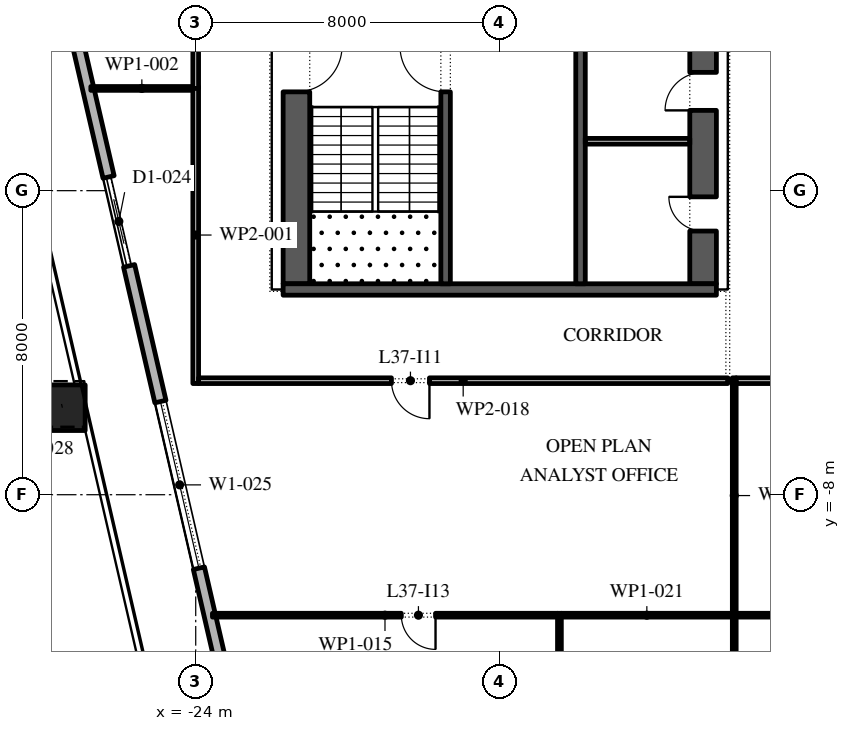
"""IFC4 building model, lengths in metres.
Left out: names, types, materials, properties, quantities, classifications, styles, units other than length and angle.
Written with IfcOpenShell. Run it as: python <this file> out.ifc"""

import sys

from ifc_helpers import new_model, si_unit, direction, frame, frame_2d, origin, origin_2d, place, context, subcontext, project, spatial, rectangle, extrude, element, fill, save


model = new_model("IFC4")
c1 = context("Model", 3, precision=1e-05, world=origin(), true_north=direction((0.0, 1.0)))
c2 = subcontext(c1, "Body", "Model", "MODEL_VIEW")
j1 = project(units=[si_unit("LENGTHUNIT", "METRE"), si_unit("PLANEANGLEUNIT", "RADIAN")], contexts=[c1])
p1 = place(None, origin())
s1 = spatial("IfcSite", under=j1, at=p1, CompositionType="ELEMENT")
p2 = place(p1, origin())
s2 = spatial("IfcBuilding", under=s1, at=p2, CompositionType="ELEMENT")
p3 = place(p2, frame((0.0, 0.0, 171.6)))
s3 = spatial("IfcBuildingStorey", under=s2, at=p3, CompositionType="ELEMENT", Elevation=171.6)
p4 = place(p3, frame((-27.509, -5.711, 0.0), z_axis=(-0.005404479485, 0.023361298418, 0.999712479335), x_axis=(-0.974268511785, -0.225390476607, 0.0)))
e1 = element("IfcColumn", 1, at=p4, inside=s3, PredefinedType="COLUMN", context=c2, shape_type="SweptSolid", body=[
    extrude(rectangle(XDim=1.2, YDim=1.2, at=origin_2d()), origin(), (0.0, 0.0, 1.0), 4.201),
])
p5 = place(p3, frame((-17.592, -20.657, 0.0), z_axis=(0.0, 0.0, 1.0), x_axis=(0.974370243697, 0.224950279389, 0.0)))
e2 = element("IfcWall", 2, at=p5, inside=s3, PredefinedType="STANDARD", context=c2, shape_type="SweptSolid", body=[
    extrude(rectangle(XDim=49.5, YDim=0.3, at=frame_2d((24.75, 0.0))), origin(), (0.0, 0.0, 1.0), 4.0),
])
p6 = place(p5, frame((3.6, 0.0, 0.0)))
e3 = element("IfcOpeningElement", 3, at=p6, cuts=e2, PredefinedType="OPENING", context=c2, shape_type="SweptSolid", body=[
    extrude(rectangle(XDim=2.4, YDim=3.5, at=frame_2d((1.2, 1.75))), frame((0.0, 0.16, 0.0), z_axis=(0.0, -1.0, 0.0), x_axis=(1.0, 0.0, 0.0)), (0.0, 0.0, 1.0), 0.32),
])
p7 = place(p5, frame((9.9, 0.0, 0.45)))
e4 = element("IfcOpeningElement", 4, at=p7, cuts=e2, PredefinedType="OPENING", context=c2, shape_type="SweptSolid", body=[
    extrude(rectangle(XDim=4.5, YDim=2.575, at=frame_2d((2.25, 1.288))), frame((0.0, 0.16, 0.0), z_axis=(0.0, -1.0, 0.0), x_axis=(1.0, 0.0, 0.0)), (0.0, 0.0, 1.0), 0.32),
])
p8 = place(p5, frame((18.2, 0.0, 0.45)))
e5 = element("IfcOpeningElement", 5, at=p8, cuts=e2, PredefinedType="OPENING", context=c2, shape_type="SweptSolid", body=[
    extrude(rectangle(XDim=4.5, YDim=3.05, at=frame_2d((2.25, 1.525))), frame((0.0, 0.16, 0.0), z_axis=(0.0, -1.0, 0.0), x_axis=(1.0, 0.0, 0.0)), (0.0, 0.0, 1.0), 0.32),
])
p9 = place(p5, frame((26.5, 0.0, 0.45)))
e6 = element("IfcOpeningElement", 6, at=p9, cuts=e2, PredefinedType="OPENING", context=c2, shape_type="SweptSolid", body=[
    extrude(rectangle(XDim=4.5, YDim=2.75, at=frame_2d((2.25, 1.375))), frame((0.0, 0.16, 0.0), z_axis=(0.0, -1.0, 0.0), x_axis=(1.0, 0.0, 0.0)), (0.0, 0.0, 1.0), 0.32),
])
p10 = place(p5, frame((36.8, 0.0, 0.0)))
e7 = element("IfcOpeningElement", 7, at=p10, cuts=e2, PredefinedType="OPENING", context=c2, shape_type="SweptSolid", body=[
    extrude(rectangle(XDim=2.4, YDim=3.275, at=frame_2d((1.2, 1.637))), frame((0.0, 0.16, 0.0), z_axis=(0.0, -1.0, 0.0), x_axis=(1.0, 0.0, 0.0)), (0.0, 0.0, 1.0), 0.32),
])
p11 = place(p5, frame((43.1, 0.0, 0.45)))
e8 = element("IfcOpeningElement", 8, at=p11, cuts=e2, PredefinedType="OPENING", context=c2, shape_type="SweptSolid", body=[
    extrude(rectangle(XDim=4.5, YDim=2.875, at=frame_2d((2.25, 1.438))), frame((0.0, 0.16, 0.0), z_axis=(0.0, -1.0, 0.0), x_axis=(1.0, 0.0, 0.0)), (0.0, 0.0, 1.0), 0.32),
])
p12 = place(p3, frame((-33.157, 30.092, 0.0), z_axis=(0.0, 0.0, 1.0), x_axis=(0.224950279389, -0.974370243697, 0.0)))
e9 = element("IfcWall", 9, at=p12, inside=s3, PredefinedType="STANDARD", context=c2, shape_type="SweptSolid", body=[
    extrude(rectangle(XDim=49.5, YDim=0.3, at=frame_2d((24.75, 0.0))), origin(), (0.0, 0.0, 1.0), 4.0),
])
p13 = place(p12, frame((2.207, 0.0, 0.0)))
e10 = element("IfcOpeningElement", 10, at=p13, cuts=e9, PredefinedType="OPENING", context=c2, shape_type="SweptSolid", body=[
    extrude(rectangle(XDim=2.4, YDim=3.5, at=frame_2d((1.2, 1.75))), frame((0.0, 0.16, 0.0), z_axis=(0.0, -1.0, 0.0), x_axis=(1.0, 0.0, 0.0)), (0.0, 0.0, 1.0), 0.32),
])
p14 = place(p12, frame((8.121, 0.0, 0.45)))
e11 = element("IfcOpeningElement", 11, at=p14, cuts=e9, PredefinedType="OPENING", context=c2, shape_type="SweptSolid", body=[
    extrude(rectangle(XDim=4.5, YDim=2.825, at=frame_2d((2.25, 1.413))), frame((0.0, 0.16, 0.0), z_axis=(0.0, -1.0, 0.0), x_axis=(1.0, 0.0, 0.0)), (0.0, 0.0, 1.0), 0.32),
])
p15 = place(p12, frame((15.236, 0.0, 0.45)))
e12 = element("IfcOpeningElement", 12, at=p15, cuts=e9, PredefinedType="OPENING", context=c2, shape_type="SweptSolid", body=[
    extrude(rectangle(XDim=4.5, YDim=2.95, at=frame_2d((2.25, 1.475))), frame((0.0, 0.16, 0.0), z_axis=(0.0, -1.0, 0.0), x_axis=(1.0, 0.0, 0.0)), (0.0, 0.0, 1.0), 0.32),
])
p16 = place(p12, frame((22.35, 0.0, 0.45)))
e13 = element("IfcOpeningElement", 13, at=p16, cuts=e9, PredefinedType="OPENING", context=c2, shape_type="SweptSolid", body=[
    extrude(rectangle(XDim=4.5, YDim=3.0, at=frame_2d((2.25, 1.5))), frame((0.0, 0.16, 0.0), z_axis=(0.0, -1.0, 0.0), x_axis=(1.0, 0.0, 0.0)), (0.0, 0.0, 1.0), 0.32),
])
p17 = place(p12, frame((30.514, 0.0, 0.0)))
e14 = element("IfcOpeningElement", 14, at=p17, cuts=e9, PredefinedType="OPENING", context=c2, shape_type="SweptSolid", body=[
    extrude(rectangle(XDim=2.4, YDim=3.5, at=frame_2d((1.2, 1.75))), frame((0.0, 0.16, 0.0), z_axis=(0.0, -1.0, 0.0), x_axis=(1.0, 0.0, 0.0)), (0.0, 0.0, 1.0), 0.32),
])
p18 = place(p12, frame((36.579, 0.0, 0.45)))
e15 = element("IfcOpeningElement", 15, at=p18, cuts=e9, PredefinedType="OPENING", context=c2, shape_type="SweptSolid", body=[
    extrude(rectangle(XDim=4.5, YDim=3.05, at=frame_2d((2.25, 1.525))), frame((0.0, 0.16, 0.0), z_axis=(0.0, -1.0, 0.0), x_axis=(1.0, 0.0, 0.0)), (0.0, 0.0, 1.0), 0.32),
])
p19 = place(p12, frame((43.693, 0.0, 0.45)))
e16 = element("IfcOpeningElement", 16, at=p19, cuts=e9, PredefinedType="OPENING", context=c2, shape_type="SweptSolid", body=[
    extrude(rectangle(XDim=4.5, YDim=3.05, at=frame_2d((2.25, 1.525))), frame((0.0, 0.16, 0.0), z_axis=(0.0, -1.0, 0.0), x_axis=(1.0, 0.0, 0.0)), (0.0, 0.0, 1.0), 0.32),
])
p20 = place(p3, frame((-21.35, -2.45, 0.0), z_axis=(0.0, 0.0, 1.0), x_axis=(0.0, 1.0, 0.0)))
e17 = element("IfcWall", 17, at=p20, inside=s3, PredefinedType="SHEAR", context=c2, shape_type="SweptSolid", body=[
    extrude(rectangle(XDim=27.9, YDim=0.7, at=frame_2d((13.95, 0.0))), origin(), (0.0, 0.0, 1.0), 4.0),
])
p21 = place(p20, frame((5.05, 0.0, 0.0)))
e18 = element("IfcOpeningElement", 18, at=p21, cuts=e17, PredefinedType="OPENING", context=c2, shape_type="SweptSolid", body=[
    extrude(rectangle(XDim=1.2, YDim=2.1, at=frame_2d((0.6, 1.05))), frame((0.0, 0.36, 0.0), z_axis=(0.0, -1.0, 0.0), x_axis=(1.0, 0.0, 0.0)), (0.0, 0.0, 1.0), 0.72),
])
p22 = place(p20, frame((21.65, 0.0, 0.0)))
e19 = element("IfcOpeningElement", 19, at=p22, cuts=e17, PredefinedType="OPENING", context=c2, shape_type="SweptSolid", body=[
    extrude(rectangle(XDim=1.2, YDim=2.1, at=frame_2d((0.6, 1.05))), frame((0.0, 0.36, 0.0), z_axis=(0.0, -1.0, 0.0), x_axis=(1.0, 0.0, 0.0)), (0.0, 0.0, 1.0), 0.72),
])
p23 = place(p3, frame((-10.65, -2.45, 0.0), z_axis=(0.0, 0.0, 1.0), x_axis=(0.0, 1.0, 0.0)))
e20 = element("IfcWall", 20, at=p23, inside=s3, PredefinedType="SHEAR", context=c2, shape_type="SweptSolid", body=[
    extrude(rectangle(XDim=27.9, YDim=0.7, at=frame_2d((13.95, 0.0))), origin(), (0.0, 0.0, 1.0), 4.0),
])
p24 = place(p23, frame((23.65, 0.0, 0.0)))
e21 = element("IfcOpeningElement", 21, at=p24, cuts=e20, PredefinedType="OPENING", context=c2, shape_type="SweptSolid", body=[
    extrude(rectangle(XDim=2.4, YDim=2.1, at=frame_2d((1.2, 1.05))), frame((0.0, 0.36, 0.0), z_axis=(0.0, -1.0, 0.0), x_axis=(1.0, 0.0, 0.0)), (0.0, 0.0, 1.0), 0.72),
])
p25 = place(p23, frame((1.387, 0.0, 0.0)))
e22 = element("IfcOpeningElement", 22, at=p25, cuts=e20, PredefinedType="OPENING", context=c2, shape_type="SweptSolid", body=[
    extrude(rectangle(XDim=0.9, YDim=2.1, at=frame_2d((0.45, 1.05))), frame((0.0, 0.36, 0.0), z_axis=(0.0, -1.0, 0.0), x_axis=(1.0, 0.0, 0.0)), (0.0, 0.0, 1.0), 0.72),
])
p26 = place(p23, frame((4.562, 0.0, 0.0)))
e23 = element("IfcOpeningElement", 23, at=p26, cuts=e20, PredefinedType="OPENING", context=c2, shape_type="SweptSolid", body=[
    extrude(rectangle(XDim=1.0, YDim=2.1, at=frame_2d((0.5, 1.05))), frame((0.0, 0.36, 0.0), z_axis=(0.0, -1.0, 0.0), x_axis=(1.0, 0.0, 0.0)), (0.0, 0.0, 1.0), 0.72),
])
p27 = place(p3, frame((-21.7, -2.6, 0.0), z_axis=(0.0, 0.0, 1.0), x_axis=(1.0, 0.0, 0.0)))
e24 = element("IfcWall", 24, at=p27, inside=s3, PredefinedType="SHEAR", context=c2, shape_type="SweptSolid", body=[
    extrude(rectangle(XDim=11.4, YDim=0.3, at=frame_2d((5.7, 0.0))), origin(), (0.0, 0.0, 1.0), 4.0),
])
p28 = place(p3, frame((-17.425, -2.45, 0.0), z_axis=(0.0, 0.0, 1.0), x_axis=(0.0, 1.0, 0.0)))
e25 = element("IfcWall", 25, at=p28, inside=s3, PredefinedType="SHEAR", context=c2, shape_type="SweptSolid", body=[
    extrude(rectangle(XDim=6.3, YDim=0.25, at=frame_2d((3.15, 0.0))), origin(), (0.0, 0.0, 1.0), 4.0),
])
p29 = place(p28, frame((5.05, 0.0, 0.0)))
e26 = element("IfcOpeningElement", 26, at=p29, cuts=e25, PredefinedType="OPENING", context=c2, shape_type="SweptSolid", body=[
    extrude(rectangle(XDim=1.2, YDim=2.1, at=frame_2d((0.6, 1.05))), frame((0.0, 0.135, 0.0), z_axis=(0.0, -1.0, 0.0), x_axis=(1.0, 0.0, 0.0)), (0.0, 0.0, 1.0), 0.27),
])
p30 = place(p3, frame((-13.875, -2.45, 0.0), z_axis=(0.0, 0.0, 1.0), x_axis=(0.0, 1.0, 0.0)))
e27 = element("IfcWall", 27, at=p30, inside=s3, PredefinedType="SHEAR", context=c2, shape_type="SweptSolid", body=[
    extrude(rectangle(XDim=21.3, YDim=0.25, at=frame_2d((10.65, 0.0))), origin(), (0.0, 0.0, 1.0), 4.0),
])
p31 = place(p30, frame((17.786, 0.0, 0.0)))
e28 = element("IfcOpeningElement", 28, at=p31, cuts=e27, PredefinedType="OPENING", context=c2, shape_type="SweptSolid", body=[
    extrude(rectangle(XDim=0.9, YDim=2.1, at=frame_2d((0.45, 1.05))), frame((0.0, 0.135, 0.0), z_axis=(0.0, -1.0, 0.0), x_axis=(1.0, 0.0, 0.0)), (0.0, 0.0, 1.0), 0.27),
])
p32 = place(p30, frame((6.971, 0.0, 0.0)))
e29 = element("IfcOpeningElement", 29, at=p32, cuts=e27, PredefinedType="OPENING", context=c2, shape_type="SweptSolid", body=[
    extrude(rectangle(XDim=1.1, YDim=2.1, at=frame_2d((0.55, 1.05))), frame((0.0, 0.135, 0.0), z_axis=(0.0, -1.0, 0.0), x_axis=(1.0, 0.0, 0.0)), (0.0, 0.0, 1.0), 0.27),
])
p33 = place(p30, frame((9.114, 0.0, 0.0)))
e30 = element("IfcOpeningElement", 30, at=p33, cuts=e27, PredefinedType="OPENING", context=c2, shape_type="SweptSolid", body=[
    extrude(rectangle(XDim=1.1, YDim=2.1, at=frame_2d((0.55, 1.05))), frame((0.0, 0.135, 0.0), z_axis=(0.0, -1.0, 0.0), x_axis=(1.0, 0.0, 0.0)), (0.0, 0.0, 1.0), 0.27),
])
p34 = place(p30, frame((11.257, 0.0, 0.0)))
e31 = element("IfcOpeningElement", 31, at=p34, cuts=e27, PredefinedType="OPENING", context=c2, shape_type="SweptSolid", body=[
    extrude(rectangle(XDim=1.1, YDim=2.1, at=frame_2d((0.55, 1.05))), frame((0.0, 0.135, 0.0), z_axis=(0.0, -1.0, 0.0), x_axis=(1.0, 0.0, 0.0)), (0.0, 0.0, 1.0), 0.27),
])
p35 = place(p30, frame((13.4, 0.0, 0.0)))
e32 = element("IfcOpeningElement", 32, at=p35, cuts=e27, PredefinedType="OPENING", context=c2, shape_type="SweptSolid", body=[
    extrude(rectangle(XDim=1.1, YDim=2.1, at=frame_2d((0.55, 1.05))), frame((0.0, 0.135, 0.0), z_axis=(0.0, -1.0, 0.0), x_axis=(1.0, 0.0, 0.0)), (0.0, 0.0, 1.0), 0.27),
])
p36 = place(p3, frame((-13.75, 1.3, 0.0), z_axis=(0.0, 0.0, 1.0), x_axis=(1.0, 0.0, 0.0)))
e33 = element("IfcWall", 33, at=p36, inside=s3, PredefinedType="PARTITIONING", context=c2, shape_type="SweptSolid", body=[
    extrude(rectangle(XDim=2.75, YDim=0.15, at=frame_2d((1.375, 0.0))), origin(), (0.0, 0.0, 1.0), 4.0),
])
p37 = place(p3, frame((-24.0, -5.075, 0.0), z_axis=(0.0, 0.0, 1.0), x_axis=(0.0, 1.0, 0.0)))
e34 = element("IfcWall", 34, at=p37, inside=s3, PredefinedType="PARTITIONING", context=c2, shape_type="SweptSolid", body=[
    extrude(rectangle(XDim=7.815, YDim=0.15, at=frame_2d((3.907, 0.0))), origin(), (0.0, 0.0, 1.0), 4.0),
])
p38 = place(p3, frame((-24.075, 2.69, 0.0), z_axis=(0.0, 0.0, 1.0), x_axis=(-1.0, 0.0, 0.0)))
e35 = element("IfcWall", 35, at=p38, inside=s3, PredefinedType="PARTITIONING", context=c2, shape_type="SweptSolid", body=[
    extrude(rectangle(XDim=2.685, YDim=0.1, at=frame_2d((1.343, 0.0))), origin(), (0.0, 0.0, 1.0), 4.0),
])
p39 = place(p3, frame((-24.0, 2.69, 0.0), z_axis=(0.0, 0.0, 1.0), x_axis=(0.0, 1.0, 0.0)))
e36 = element("IfcWall", 36, at=p39, inside=s3, PredefinedType="PARTITIONING", context=c2, shape_type="SweptSolid", body=[
    extrude(rectangle(XDim=12.74, YDim=0.15, at=frame_2d((6.37, 0.0))), origin(), (0.0, 0.0, 1.0), 4.0),
])
p40 = place(p39, frame((5.79, 0.0, 0.0)))
e37 = element("IfcOpeningElement", 37, at=p40, cuts=e36, PredefinedType="OPENING", context=c2, shape_type="SweptSolid", body=[
    extrude(rectangle(XDim=1.0, YDim=2.1, at=frame_2d((0.5, 1.05))), frame((0.0, 0.085, 0.0), z_axis=(0.0, -1.0, 0.0), x_axis=(1.0, 0.0, 0.0)), (0.0, 0.0, 1.0), 0.17),
])
p41 = place(p3, frame((-14.43, -19.856, 0.0), z_axis=(0.0, 0.0, 1.0), x_axis=(0.0, 1.0, 0.0)))
e38 = element("IfcWall", 38, at=p41, inside=s3, PredefinedType="PARTITIONING", context=c2, shape_type="SweptSolid", body=[
    extrude(rectangle(XDim=8.736, YDim=0.1, at=frame_2d((4.368, 0.0))), origin(), (0.0, 0.0, 1.0), 4.0),
])
p42 = place(p3, frame((-14.48, -11.17, 0.0), z_axis=(0.0, 0.0, 1.0), x_axis=(-1.0, 0.0, 0.0)))
e39 = element("IfcWall", 39, at=p42, inside=s3, PredefinedType="PARTITIONING", context=c2, shape_type="SweptSolid", body=[
    extrude(rectangle(XDim=9.08, YDim=0.1, at=frame_2d((4.54, 0.0))), origin(), (0.0, 0.0, 1.0), 4.0),
])
p43 = place(p42, frame((3.21, 0.0, 0.0)))
e40 = element("IfcOpeningElement", 40, at=p43, cuts=e39, PredefinedType="OPENING", context=c2, shape_type="SweptSolid", body=[
    extrude(rectangle(XDim=0.9, YDim=2.1, at=frame_2d((0.45, 1.05))), frame((0.0, 0.06, 0.0), z_axis=(0.0, -1.0, 0.0), x_axis=(1.0, 0.0, 0.0)), (0.0, 0.0, 1.0), 0.12),
])
p44 = place(p3, frame((-10.0, -5.0, 0.0), z_axis=(0.0, 0.0, 1.0), x_axis=(-1.0, 0.0, 0.0)))
e41 = element("IfcWall", 41, at=p44, inside=s3, PredefinedType="PARTITIONING", context=c2, shape_type="SweptSolid", body=[
    extrude(rectangle(XDim=13.925, YDim=0.15, at=frame_2d((6.962, 0.0))), origin(), (0.0, 0.0, 1.0), 4.0),
])
p45 = place(p44, frame((7.85, 0.0, 0.0)))
e42 = element("IfcOpeningElement", 42, at=p45, cuts=e41, PredefinedType="OPENING", context=c2, shape_type="SweptSolid", body=[
    extrude(rectangle(XDim=1.0, YDim=2.1, at=frame_2d((0.5, 1.05))), frame((0.0, 0.085, 0.0), z_axis=(0.0, -1.0, 0.0), x_axis=(1.0, 0.0, 0.0)), (0.0, 0.0, 1.0), 0.17),
])
p46 = place(p3, frame((-9.83, -18.794, 0.0), z_axis=(0.0, 0.0, 1.0), x_axis=(0.0, 1.0, 0.0)))
e43 = element("IfcWall", 43, at=p46, inside=s3, PredefinedType="PARTITIONING", context=c2, shape_type="SweptSolid", body=[
    extrude(rectangle(XDim=7.674, YDim=0.1, at=frame_2d((3.837, 0.0))), origin(), (0.0, 0.0, 1.0), 4.0),
])
p47 = place(p46, frame((3.274, 0.0, 0.0)))
e44 = element("IfcOpeningElement", 44, at=p47, cuts=e43, PredefinedType="OPENING", context=c2, shape_type="SweptSolid", body=[
    extrude(rectangle(XDim=0.9, YDim=2.1, at=frame_2d((0.45, 1.05))), frame((0.0, 0.06, 0.0), z_axis=(0.0, -1.0, 0.0), x_axis=(1.0, 0.0, 0.0)), (0.0, 0.0, 1.0), 0.12),
])
p48 = place(p3, frame((-9.88, -11.17, 0.0), z_axis=(0.0, 0.0, 1.0), x_axis=(-1.0, 0.0, 0.0)))
e45 = element("IfcWall", 45, at=p48, inside=s3, PredefinedType="PARTITIONING", context=c2, shape_type="SweptSolid", body=[
    extrude(rectangle(XDim=4.5, YDim=0.1, at=frame_2d((2.25, 0.0))), origin(), (0.0, 0.0, 1.0), 4.0),
])
p49 = place(p3, frame((-9.83, -11.12, 0.0), z_axis=(0.0, 0.0, 1.0), x_axis=(0.0, 1.0, 0.0)))
e46 = element("IfcWall", 46, at=p49, inside=s3, PredefinedType="PARTITIONING", context=c2, shape_type="SweptSolid", body=[
    extrude(rectangle(XDim=6.195, YDim=0.1, at=frame_2d((3.098, 0.0))), origin(), (0.0, 0.0, 1.0), 4.0),
])
p50 = place(p3, frame((-9.78, -11.17, 0.0), z_axis=(0.0, 0.0, 1.0), x_axis=(1.0, 0.0, 0.0)))
e47 = element("IfcWall", 47, at=p50, inside=s3, PredefinedType="PARTITIONING", context=c2, shape_type="SweptSolid", body=[
    extrude(rectangle(XDim=8.755, YDim=0.1, at=frame_2d((4.377, 0.0))), origin(), (0.0, 0.0, 1.0), 4.0),
])
p51 = place(p3, frame((-1.175, -5.0, 0.0), z_axis=(0.0, 0.0, 1.0), x_axis=(-1.0, 0.0, 0.0)))
e48 = element("IfcWall", 48, at=p51, inside=s3, PredefinedType="PARTITIONING", context=c2, shape_type="SweptSolid", body=[
    extrude(rectangle(XDim=8.605, YDim=0.15, at=frame_2d((4.302, 0.0))), origin(), (0.0, 0.0, 1.0), 4.0),
])
p52 = place(p51, frame((2.005, 0.0, 0.0)))
e49 = element("IfcOpeningElement", 49, at=p52, cuts=e48, PredefinedType="OPENING", context=c2, shape_type="SweptSolid", body=[
    extrude(rectangle(XDim=1.0, YDim=2.1, at=frame_2d((0.5, 1.05))), frame((0.0, 0.085, 0.0), z_axis=(0.0, -1.0, 0.0), x_axis=(1.0, 0.0, 0.0)), (0.0, 0.0, 1.0), 0.17),
])
p53 = place(p17, origin())
e50 = element("IfcDoor", 50, at=p53, inside=s3, OperationType="DOUBLE_DOOR_SLIDING", PredefinedType="DOOR", context=c2, shape_type="SweptSolid", body=[
    extrude(rectangle(XDim=2.4, YDim=3.5, at=frame_2d((1.2, 1.75))), frame((0.0, 0.025, 0.0), z_axis=(0.0, -1.0, 0.0), x_axis=(1.0, 0.0, 0.0)), (0.0, 0.0, 1.0), 0.05),
])
fill(e14, e50)
p54 = place(p18, origin())
e51 = element("IfcWindow", 51, at=p54, inside=s3, PartitioningType="DOUBLE_PANEL_VERTICAL", PredefinedType="WINDOW", context=c2, shape_type="SweptSolid", body=[
    extrude(rectangle(XDim=4.5, YDim=3.05, at=frame_2d((2.25, 1.525))), frame((0.0, 0.03, 0.0), z_axis=(0.0, -1.0, 0.0), x_axis=(1.0, 0.0, 0.0)), (0.0, 0.0, 1.0), 0.06),
])
fill(e15, e51)
p55 = place(p29, origin())
e52 = element("IfcDoor", 52, at=p55, inside=s3, OperationType="SINGLE_SWING_LEFT", PredefinedType="DOOR", context=c2, shape_type="SweptSolid", body=[
    extrude(rectangle(XDim=1.2, YDim=2.1, at=frame_2d((0.6, 1.05))), frame((0.0, 0.025, 0.0), z_axis=(0.0, -1.0, 0.0), x_axis=(1.0, 0.0, 0.0)), (0.0, 0.0, 1.0), 0.05),
])
fill(e26, e52)
p56 = place(p21, frame((1.2, 0.0, 0.0), z_axis=(0.0, 0.0, 1.0), x_axis=(-1.0, 0.0, 0.0)))
e53 = element("IfcDoor", 53, at=p56, inside=s3, OperationType="SINGLE_SWING_RIGHT", PredefinedType="DOOR", context=c2, shape_type="SweptSolid", body=[
    extrude(rectangle(XDim=1.2, YDim=2.1, at=frame_2d((0.6, 1.05))), frame((0.0, 0.025, 0.0), z_axis=(0.0, -1.0, 0.0), x_axis=(1.0, 0.0, 0.0)), (0.0, 0.0, 1.0), 0.05),
])
fill(e18, e53)
p57 = place(p25, origin())
e54 = element("IfcDoor", 54, at=p57, inside=s3, OperationType="SINGLE_SWING_LEFT", PredefinedType="DOOR", context=c2, shape_type="SweptSolid", body=[
    extrude(rectangle(XDim=0.9, YDim=2.1, at=frame_2d((0.45, 1.05))), frame((0.0, 0.35, 0.0), z_axis=(0.0, -1.0, 0.0), x_axis=(1.0, 0.0, 0.0)), (0.0, 0.0, 1.0), 0.05),
])
fill(e22, e54)
p58 = place(p26, origin())
e55 = element("IfcDoor", 55, at=p58, inside=s3, OperationType="SINGLE_SWING_RIGHT", PredefinedType="DOOR", context=c2, shape_type="SweptSolid", body=[
    extrude(rectangle(XDim=1.0, YDim=2.1, at=frame_2d((0.5, 1.05))), frame((0.0, 0.35, 0.0), z_axis=(0.0, -1.0, 0.0), x_axis=(1.0, 0.0, 0.0)), (0.0, 0.0, 1.0), 0.05),
])
fill(e23, e55)
p59 = place(p45, origin())
e56 = element("IfcDoor", 56, at=p59, inside=s3, OperationType="SINGLE_SWING_RIGHT", PredefinedType="DOOR", context=c2, shape_type="SweptSolid", body=[
    extrude(rectangle(XDim=1.0, YDim=2.1, at=frame_2d((0.5, 1.05))), frame((0.0, 0.025, 0.0), z_axis=(0.0, -1.0, 0.0), x_axis=(1.0, 0.0, 0.0)), (0.0, 0.0, 1.0), 0.05),
])
fill(e42, e56)
p60 = place(p43, origin())
e57 = element("IfcDoor", 57, at=p60, inside=s3, OperationType="SINGLE_SWING_RIGHT", PredefinedType="DOOR", context=c2, shape_type="SweptSolid", body=[
    extrude(rectangle(XDim=0.9, YDim=2.1, at=frame_2d((0.45, 1.05))), frame((0.0, 0.025, 0.0), z_axis=(0.0, -1.0, 0.0), x_axis=(1.0, 0.0, 0.0)), (0.0, 0.0, 1.0), 0.05),
])
fill(e40, e57)
save(model, sys.argv[1])
